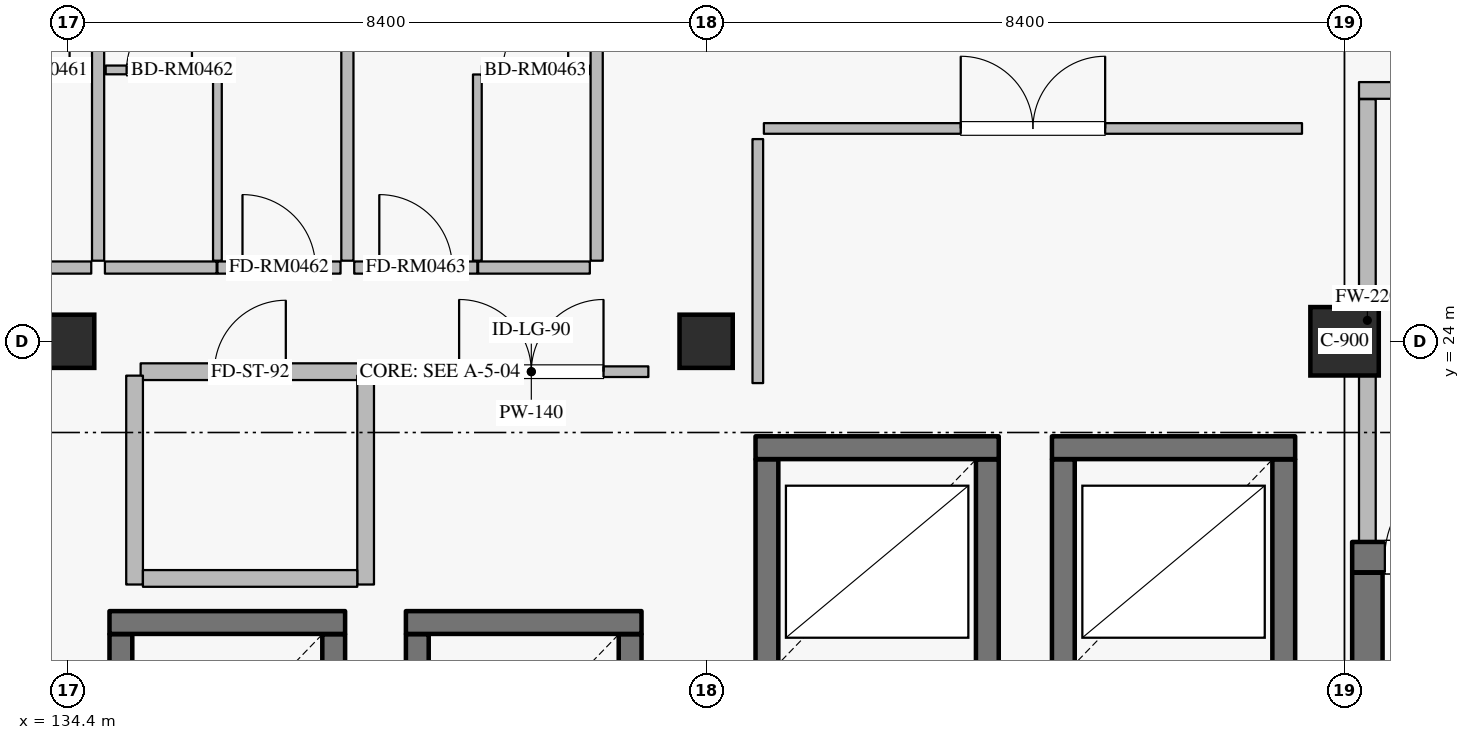
"""IFC4 building model, lengths in metres.
Left out: names, types, materials, properties, quantities, classifications, styles, units other than length and angle.
Written with IfcOpenShell. Run it as: python <this file> out.ifc"""

import sys

from ifc_helpers import new_model, si_unit, direction, frame, frame_2d, origin, origin_2d, place, context, subcontext, project, spatial, rectangle, extrude, element, fill, save


model = new_model("IFC4")
c1 = context("Model", 3, precision=1e-05, world=origin(), true_north=direction((0.0, 1.0)))
c2 = subcontext(c1, "Body", "Model", "MODEL_VIEW")
j1 = project(units=[si_unit("LENGTHUNIT", "METRE"), si_unit("PLANEANGLEUNIT", "RADIAN")], contexts=[c1])
p1 = place(None, origin())
s1 = spatial("IfcSite", under=j1, at=p1, CompositionType="ELEMENT")
p2 = place(p1, origin())
s2 = spatial("IfcBuilding", under=s1, at=p2, CompositionType="ELEMENT")
p3 = place(p2, frame((0.0, 0.0, 16.2)))
s3 = spatial("IfcBuildingStorey", under=s2, at=p3, CompositionType="ELEMENT", Elevation=16.2)
p4 = place(p3, frame((151.2, 24.0, 0.0), z_axis=(0.0, 0.0, 1.0), x_axis=(1.0, 0.0, 0.0)))
e1 = element("IfcColumn", 1, at=p4, inside=s3, PredefinedType="COLUMN", context=c2, shape_type="SweptSolid", body=[
    extrude(rectangle(XDim=0.9, YDim=0.9, at=origin_2d()), origin(), (0.0, 0.0, 1.0), 4.8),
])
for number, where, z_axis, x_axis in (
    (2, (134.4, 24.0, 0.0), (0.0, 0.0, 1.0), (1.0, 0.0, 0.0)),
    (3, (142.8, 24.0, 0.0), (0.0, 0.0, 1.0), (1.0, 0.0, 0.0)),
):
    element("IfcColumn", number, at=place(p3, frame(where, z_axis=z_axis, x_axis=x_axis)), inside=s3, PredefinedType="COLUMN", context=c2, shape_type="SweptSolid", body=[
        extrude(rectangle(XDim=0.7, YDim=0.7, at=origin_2d()), origin(), (0.0, 0.0, 1.0), 4.8),
    ])
p5 = place(p3, frame((137.9, 17.555, 0.0), z_axis=(0.0, 0.0, 1.0), x_axis=(0.0, 1.0, 0.0)))
e4 = element("IfcWall", 4, at=p5, inside=s3, PredefinedType="SHEAR", context=c2, shape_type="SweptSolid", body=[
    extrude(rectangle(XDim=2.59, YDim=0.3, at=frame_2d((1.295, 0.0))), origin(), (0.0, 0.0, 1.0), 4.535),
])
p6 = place(p3, frame((138.05, 20.3, 0.0), z_axis=(0.0, 0.0, 1.0), x_axis=(-1.0, 0.0, 0.0)))
e5 = element("IfcWall", 5, at=p6, inside=s3, PredefinedType="SHEAR", context=c2, shape_type="SweptSolid", body=[
    extrude(rectangle(XDim=3.1, YDim=0.3, at=frame_2d((1.55, 0.0))), origin(), (0.0, 0.0, 1.0), 4.535),
])
for number, where, z_axis, x_axis in (
    (6, (135.1, 20.145, 0.0), (0.0, 0.0, 1.0), (0.0, -1.0, 0.0)),
    (7, (141.8, 17.555, 0.0), (0.0, 0.0, 1.0), (0.0, 1.0, 0.0)),
):
    element("IfcWall", number, at=place(p3, frame(where, z_axis=z_axis, x_axis=x_axis)), inside=s3, PredefinedType="SHEAR", context=c2, shape_type="SweptSolid", body=[
        extrude(rectangle(XDim=2.59, YDim=0.3, at=frame_2d((1.295, 0.0))), origin(), (0.0, 0.0, 1.0), 4.535),
    ])
p7 = place(p3, frame((141.95, 20.3, 0.0), z_axis=(0.0, 0.0, 1.0), x_axis=(-1.0, 0.0, 0.0)))
e8 = element("IfcWall", 8, at=p7, inside=s3, PredefinedType="SHEAR", context=c2, shape_type="SweptSolid", body=[
    extrude(rectangle(XDim=3.1, YDim=0.3, at=frame_2d((1.55, 0.0))), origin(), (0.0, 0.0, 1.0), 4.535),
])
p8 = place(p3, frame((139.0, 20.145, 0.0), z_axis=(0.0, 0.0, 1.0), x_axis=(0.0, -1.0, 0.0)))
e9 = element("IfcWall", 9, at=p8, inside=s3, PredefinedType="SHEAR", context=c2, shape_type="SweptSolid", body=[
    extrude(rectangle(XDim=2.59, YDim=0.3, at=frame_2d((1.295, 0.0))), origin(), (0.0, 0.0, 1.0), 4.535),
])
p9 = place(p3, frame((146.5, 19.755, 0.0), z_axis=(0.0, 0.0, 1.0), x_axis=(0.0, 1.0, 0.0)))
e10 = element("IfcWall", 10, at=p9, inside=s3, PredefinedType="SHEAR", context=c2, shape_type="SweptSolid", body=[
    extrude(rectangle(XDim=2.69, YDim=0.3, at=frame_2d((1.345, 0.0))), origin(), (0.0, 0.0, 1.0), 4.535),
])
p10 = place(p3, frame((146.65, 22.6, 0.0), z_axis=(0.0, 0.0, 1.0), x_axis=(-1.0, 0.0, 0.0)))
e11 = element("IfcWall", 11, at=p10, inside=s3, PredefinedType="SHEAR", context=c2, shape_type="SweptSolid", body=[
    extrude(rectangle(XDim=3.2, YDim=0.3, at=frame_2d((1.6, 0.0))), origin(), (0.0, 0.0, 1.0), 4.535),
])
for number, where, z_axis, x_axis in (
    (12, (143.6, 22.445, 0.0), (0.0, 0.0, 1.0), (0.0, -1.0, 0.0)),
    (13, (150.4, 19.755, 0.0), (0.0, 0.0, 1.0), (0.0, 1.0, 0.0)),
):
    element("IfcWall", number, at=place(p3, frame(where, z_axis=z_axis, x_axis=x_axis)), inside=s3, PredefinedType="SHEAR", context=c2, shape_type="SweptSolid", body=[
        extrude(rectangle(XDim=2.69, YDim=0.3, at=frame_2d((1.345, 0.0))), origin(), (0.0, 0.0, 1.0), 4.535),
    ])
p11 = place(p3, frame((150.55, 22.6, 0.0), z_axis=(0.0, 0.0, 1.0), x_axis=(-1.0, 0.0, 0.0)))
e14 = element("IfcWall", 14, at=p11, inside=s3, PredefinedType="SHEAR", context=c2, shape_type="SweptSolid", body=[
    extrude(rectangle(XDim=3.2, YDim=0.3, at=frame_2d((1.6, 0.0))), origin(), (0.0, 0.0, 1.0), 4.535),
])
p12 = place(p3, frame((147.5, 22.445, 0.0), z_axis=(0.0, 0.0, 1.0), x_axis=(0.0, -1.0, 0.0)))
e15 = element("IfcWall", 15, at=p12, inside=s3, PredefinedType="SHEAR", context=c2, shape_type="SweptSolid", body=[
    extrude(rectangle(XDim=2.69, YDim=0.3, at=frame_2d((1.345, 0.0))), origin(), (0.0, 0.0, 1.0), 4.535),
])
p13 = place(p3, frame((151.3, 21.16, 0.0), z_axis=(0.0, 0.0, 1.0), x_axis=(1.0, 0.0, 0.0)))
e16 = element("IfcWall", 16, at=p13, inside=s3, PredefinedType="SHEAR", context=c2, shape_type="SweptSolid", body=[
    extrude(rectangle(XDim=8.2, YDim=0.4, at=frame_2d((4.1, 0.0))), origin(), (0.0, 0.0, 1.0), 4.535),
])
p14 = place(p13, frame((0.43, 0.0, 0.0)))
e17 = element("IfcOpeningElement", 17, at=p14, cuts=e16, PredefinedType="OPENING", context=c2, shape_type="SweptSolid", body=[
    extrude(rectangle(XDim=1.16, YDim=2.2, at=frame_2d((0.58, 1.1))), frame((0.0, 0.21, 0.0), z_axis=(0.0, -1.0, 0.0), x_axis=(1.0, 0.0, 0.0)), (0.0, 0.0, 1.0), 0.42),
])
p15 = place(p3, frame((151.5, 17.005, 0.0), z_axis=(0.0, 0.0, 1.0), x_axis=(0.0, 1.0, 0.0)))
e18 = element("IfcWall", 18, at=p15, inside=s3, PredefinedType="SHEAR", context=c2, shape_type="SweptSolid", body=[
    extrude(rectangle(XDim=3.95, YDim=0.4, at=frame_2d((1.975, 0.0))), origin(), (0.0, 0.0, 1.0), 4.535),
])
p16 = place(p3, frame((151.5, 21.365, 0.0), z_axis=(0.0, 0.0, 1.0), x_axis=(0.0, 1.0, 0.0)))
e19 = element("IfcWall", 19, at=p16, inside=s3, PredefinedType="PARTITIONING", context=c2, shape_type="SweptSolid", body=[
    extrude(rectangle(XDim=5.82, YDim=0.22, at=frame_2d((2.91, 0.0))), origin(), (0.0, 0.0, 1.0), 4.535),
])
p17 = place(p3, frame((151.39, 27.3, 0.0), z_axis=(0.0, 0.0, 1.0), x_axis=(1.0, 0.0, 0.0)))
e20 = element("IfcWall", 20, at=p17, inside=s3, PredefinedType="PARTITIONING", context=c2, shape_type="SweptSolid", body=[
    extrude(rectangle(XDim=3.82, YDim=0.22, at=frame_2d((1.91, 0.0))), origin(), (0.0, 0.0, 1.0), 4.535),
])
p18 = place(p17, frame((1.35, 0.0, 0.0)))
e21 = element("IfcOpeningElement", 21, at=p18, cuts=e20, PredefinedType="OPENING", context=c2, shape_type="SweptSolid", body=[
    extrude(rectangle(XDim=1.12, YDim=2.2, at=frame_2d((0.56, 1.1))), frame((0.0, 0.12, 0.0), z_axis=(0.0, -1.0, 0.0), x_axis=(1.0, 0.0, 0.0)), (0.0, 0.0, 1.0), 0.24),
])
p19 = place(p3, frame((133.24, 24.97, 0.0), z_axis=(0.0, 0.0, 1.0), x_axis=(1.0, 0.0, 0.0)))
e22 = element("IfcWall", 22, at=p19, inside=s3, PredefinedType="PARTITIONING", context=c2, shape_type="SweptSolid", body=[
    extrude(rectangle(XDim=1.47, YDim=0.16, at=frame_2d((0.735, 0.0))), origin(), (0.0, 0.0, 1.0), 4.535),
])
p20 = place(p3, frame((133.29, 27.57, 0.0), z_axis=(0.0, 0.0, 1.0), x_axis=(1.0, 0.0, 0.0)))
e23 = element("IfcWall", 23, at=p20, inside=s3, PredefinedType="PARTITIONING", context=c2, shape_type="SweptSolid", body=[
    extrude(rectangle(XDim=1.41, YDim=0.115, at=frame_2d((0.705, 0.0))), origin(), (0.0, 0.0, 1.0), 4.535),
])
p21 = place(p20, frame((0.275, 0.0, 0.0)))
e24 = element("IfcOpeningElement", 24, at=p21, cuts=e23, PredefinedType="OPENING", context=c2, shape_type="SweptSolid", body=[
    extrude(rectangle(XDim=0.86, YDim=2.12, at=frame_2d((0.43, 1.06))), frame((0.0, 0.067, 0.0), z_axis=(0.0, -1.0, 0.0), x_axis=(1.0, 0.0, 0.0)), (0.0, 0.0, 1.0), 0.135),
])
p22 = place(p3, frame((134.89, 24.97, 0.0), z_axis=(0.0, 0.0, 1.0), x_axis=(1.0, 0.0, 0.0)))
e25 = element("IfcWall", 25, at=p22, inside=s3, PredefinedType="PARTITIONING", context=c2, shape_type="SweptSolid", body=[
    extrude(rectangle(XDim=1.47, YDim=0.16, at=frame_2d((0.735, 0.0))), origin(), (0.0, 0.0, 1.0), 4.535),
])
p23 = place(p3, frame((136.37, 24.97, 0.0), z_axis=(0.0, 0.0, 1.0), x_axis=(1.0, 0.0, 0.0)))
e26 = element("IfcWall", 26, at=p23, inside=s3, PredefinedType="PARTITIONING", context=c2, shape_type="SweptSolid", body=[
    extrude(rectangle(XDim=1.62, YDim=0.16, at=frame_2d((0.81, 0.0))), origin(), (0.0, 0.0, 1.0), 4.535),
])
p24 = place(p23, frame((0.33, 0.0, 0.0)))
e27 = element("IfcOpeningElement", 27, at=p24, cuts=e26, PredefinedType="OPENING", context=c2, shape_type="SweptSolid", body=[
    extrude(rectangle(XDim=0.96, YDim=2.2, at=frame_2d((0.48, 1.1))), frame((0.0, 0.09, 0.0), z_axis=(0.0, -1.0, 0.0), x_axis=(1.0, 0.0, 0.0)), (0.0, 0.0, 1.0), 0.18),
])
p25 = place(p3, frame((136.37, 25.06, 0.0), z_axis=(0.0, 0.0, 1.0), x_axis=(0.0, 1.0, 0.0)))
e28 = element("IfcWall", 28, at=p25, inside=s3, PredefinedType="PARTITIONING", context=c2, shape_type="SweptSolid", body=[
    extrude(rectangle(XDim=2.45, YDim=0.115, at=frame_2d((1.225, 0.0))), origin(), (0.0, 0.0, 1.0), 4.535),
])
p26 = place(p3, frame((134.9, 27.57, 0.0), z_axis=(0.0, 0.0, 1.0), x_axis=(1.0, 0.0, 0.0)))
e29 = element("IfcWall", 29, at=p26, inside=s3, PredefinedType="PARTITIONING", context=c2, shape_type="SweptSolid", body=[
    extrude(rectangle(XDim=1.41, YDim=0.115, at=frame_2d((0.705, 0.0))), origin(), (0.0, 0.0, 1.0), 4.535),
])
p27 = place(p26, frame((0.275, 0.0, 0.0)))
e30 = element("IfcOpeningElement", 30, at=p27, cuts=e29, PredefinedType="OPENING", context=c2, shape_type="SweptSolid", body=[
    extrude(rectangle(XDim=0.86, YDim=2.12, at=frame_2d((0.43, 1.06))), frame((0.0, 0.067, 0.0), z_axis=(0.0, -1.0, 0.0), x_axis=(1.0, 0.0, 0.0)), (0.0, 0.0, 1.0), 0.135),
])
p28 = place(p3, frame((134.8, 25.06, 0.0), z_axis=(0.0, 0.0, 1.0), x_axis=(0.0, 1.0, 0.0)))
e31 = element("IfcWall", 31, at=p28, inside=s3, PredefinedType="PARTITIONING", context=c2, shape_type="SweptSolid", body=[
    extrude(rectangle(XDim=6.6, YDim=0.16, at=frame_2d((3.3, 0.0))), origin(), (0.0, 0.0, 1.0), 4.535),
])
p29 = place(p3, frame((138.17, 24.97, 0.0), z_axis=(0.0, 0.0, 1.0), x_axis=(1.0, 0.0, 0.0)))
e32 = element("IfcWall", 32, at=p29, inside=s3, PredefinedType="PARTITIONING", context=c2, shape_type="SweptSolid", body=[
    extrude(rectangle(XDim=1.62, YDim=0.16, at=frame_2d((0.81, 0.0))), origin(), (0.0, 0.0, 1.0), 4.535),
])
p30 = place(p29, frame((0.33, 0.0, 0.0)))
e33 = element("IfcOpeningElement", 33, at=p30, cuts=e32, PredefinedType="OPENING", context=c2, shape_type="SweptSolid", body=[
    extrude(rectangle(XDim=0.96, YDim=2.2, at=frame_2d((0.48, 1.1))), frame((0.0, 0.09, 0.0), z_axis=(0.0, -1.0, 0.0), x_axis=(1.0, 0.0, 0.0)), (0.0, 0.0, 1.0), 0.18),
])
p31 = place(p3, frame((139.8, 24.97, 0.0), z_axis=(0.0, 0.0, 1.0), x_axis=(1.0, 0.0, 0.0)))
e34 = element("IfcWall", 34, at=p31, inside=s3, PredefinedType="PARTITIONING", context=c2, shape_type="SweptSolid", body=[
    extrude(rectangle(XDim=1.47, YDim=0.16, at=frame_2d((0.735, 0.0))), origin(), (0.0, 0.0, 1.0), 4.535),
])
p32 = place(p3, frame((139.79, 25.06, 0.0), z_axis=(0.0, 0.0, 1.0), x_axis=(0.0, 1.0, 0.0)))
e35 = element("IfcWall", 35, at=p32, inside=s3, PredefinedType="PARTITIONING", context=c2, shape_type="SweptSolid", body=[
    extrude(rectangle(XDim=2.45, YDim=0.115, at=frame_2d((1.225, 0.0))), origin(), (0.0, 0.0, 1.0), 4.535),
])
p33 = place(p3, frame((139.85, 27.57, 0.0), z_axis=(0.0, 0.0, 1.0), x_axis=(1.0, 0.0, 0.0)))
e36 = element("IfcWall", 36, at=p33, inside=s3, PredefinedType="PARTITIONING", context=c2, shape_type="SweptSolid", body=[
    extrude(rectangle(XDim=1.41, YDim=0.115, at=frame_2d((0.705, 0.0))), origin(), (0.0, 0.0, 1.0), 4.535),
])
p34 = place(p33, frame((0.275, 0.0, 0.0)))
e37 = element("IfcOpeningElement", 37, at=p34, cuts=e36, PredefinedType="OPENING", context=c2, shape_type="SweptSolid", body=[
    extrude(rectangle(XDim=0.86, YDim=2.12, at=frame_2d((0.43, 1.06))), frame((0.0, 0.067, 0.0), z_axis=(0.0, -1.0, 0.0), x_axis=(1.0, 0.0, 0.0)), (0.0, 0.0, 1.0), 0.135),
])
p35 = place(p3, frame((138.08, 25.06, 0.0), z_axis=(0.0, 0.0, 1.0), x_axis=(0.0, 1.0, 0.0)))
e38 = element("IfcWall", 38, at=p35, inside=s3, PredefinedType="PARTITIONING", context=c2, shape_type="SweptSolid", body=[
    extrude(rectangle(XDim=6.6, YDim=0.16, at=frame_2d((3.3, 0.0))), origin(), (0.0, 0.0, 1.0), 4.535),
])
p36 = place(p3, frame((141.36, 25.06, 0.0), z_axis=(0.0, 0.0, 1.0), x_axis=(0.0, 1.0, 0.0)))
e39 = element("IfcWall", 39, at=p36, inside=s3, PredefinedType="PARTITIONING", context=c2, shape_type="SweptSolid", body=[
    extrude(rectangle(XDim=3.39, YDim=0.16, at=frame_2d((1.695, 0.0))), origin(), (0.0, 0.0, 1.0), 4.535),
])
p37 = place(p3, frame((138.96, 23.6, 0.0), z_axis=(0.0, 0.0, 1.0), x_axis=(1.0, 0.0, 0.0)))
e40 = element("IfcWall", 40, at=p37, inside=s3, PredefinedType="PARTITIONING", context=c2, shape_type="SweptSolid", body=[
    extrude(rectangle(XDim=3.08, YDim=0.14, at=frame_2d((1.54, 0.0))), origin(), (0.0, 0.0, 1.0), 4.535),
])
p38 = place(p37, frame((0.59, 0.0, 0.0)))
e41 = element("IfcOpeningElement", 41, at=p38, cuts=e40, PredefinedType="OPENING", context=c2, shape_type="SweptSolid", body=[
    extrude(rectangle(XDim=1.9, YDim=2.4, at=frame_2d((0.95, 1.2))), frame((0.0, 0.08, 0.0), z_axis=(0.0, -1.0, 0.0), x_axis=(1.0, 0.0, 0.0)), (0.0, 0.0, 1.0), 0.16),
])
p39 = place(p3, frame((135.36, 23.6, 0.0), z_axis=(0.0, 0.0, 1.0), x_axis=(1.0, 0.0, 0.0)))
e42 = element("IfcWall", 42, at=p39, inside=s3, PredefinedType="PARTITIONING", context=c2, shape_type="SweptSolid", body=[
    extrude(rectangle(XDim=2.88, YDim=0.22, at=frame_2d((1.44, 0.0))), origin(), (0.0, 0.0, 1.0), 4.535),
])
p40 = place(p39, frame((0.97, 0.0, 0.0)))
e43 = element("IfcOpeningElement", 43, at=p40, cuts=e42, PredefinedType="OPENING", context=c2, shape_type="SweptSolid", body=[
    extrude(rectangle(XDim=0.94, YDim=2.15, at=frame_2d((0.47, 1.075))), frame((0.0, 0.12, 0.0), z_axis=(0.0, -1.0, 0.0), x_axis=(1.0, 0.0, 0.0)), (0.0, 0.0, 1.0), 0.24),
])
p41 = place(p3, frame((143.56, 26.8, 0.0), z_axis=(0.0, 0.0, 1.0), x_axis=(1.0, 0.0, 0.0)))
e44 = element("IfcWall", 44, at=p41, inside=s3, PredefinedType="PARTITIONING", context=c2, shape_type="SweptSolid", body=[
    extrude(rectangle(XDim=7.08, YDim=0.14, at=frame_2d((3.54, 0.0))), origin(), (0.0, 0.0, 1.0), 4.535),
])
p42 = place(p41, frame((2.59, 0.0, 0.0)))
e45 = element("IfcOpeningElement", 45, at=p42, cuts=e44, PredefinedType="OPENING", context=c2, shape_type="SweptSolid", body=[
    extrude(rectangle(XDim=1.9, YDim=2.4, at=frame_2d((0.95, 1.2))), frame((0.0, 0.08, 0.0), z_axis=(0.0, -1.0, 0.0), x_axis=(1.0, 0.0, 0.0)), (0.0, 0.0, 1.0), 0.16),
])
p43 = place(p3, frame((143.48, 23.45, 0.0), z_axis=(0.0, 0.0, 1.0), x_axis=(0.0, 1.0, 0.0)))
e46 = element("IfcWall", 46, at=p43, inside=s3, PredefinedType="PARTITIONING", context=c2, shape_type="SweptSolid", body=[
    extrude(rectangle(XDim=3.21, YDim=0.14, at=frame_2d((1.605, 0.0))), origin(), (0.0, 0.0, 1.0), 4.535),
])
for number, where, z_axis, x_axis in (
    (47, (135.28, 20.8, 0.0), (0.0, 0.0, 1.0), (0.0, 1.0, 0.0)),
    (48, (138.32, 20.8, 0.0), (0.0, 0.0, 1.0), (0.0, 1.0, 0.0)),
):
    element("IfcWall", number, at=place(p3, frame(where, z_axis=z_axis, x_axis=x_axis)), inside=s3, PredefinedType="PARTITIONING", context=c2, shape_type="SweptSolid", body=[
        extrude(rectangle(XDim=2.748, YDim=0.22, at=frame_2d((1.374, 0.0))), origin(), (0.0, 0.0, 1.0), 4.535),
    ])
p44 = place(p3, frame((135.39, 20.88, 0.0), z_axis=(0.0, 0.0, 1.0), x_axis=(1.0, 0.0, 0.0)))
e49 = element("IfcWall", 49, at=p44, inside=s3, PredefinedType="PARTITIONING", context=c2, shape_type="SweptSolid", body=[
    extrude(rectangle(XDim=2.82, YDim=0.22, at=frame_2d((1.41, 0.0))), origin(), (0.0, 0.0, 1.0), 4.535),
])
p45 = place(p14, origin())
e50 = element("IfcDoor", 50, at=p45, inside=s3, OperationType="SINGLE_SWING_RIGHT", PredefinedType="DOOR", context=c2, shape_type="SweptSolid", body=[
    extrude(rectangle(XDim=1.16, YDim=2.2, at=frame_2d((0.58, 1.1))), frame((0.0, 0.025, 0.0), z_axis=(0.0, -1.0, 0.0), x_axis=(1.0, 0.0, 0.0)), (0.0, 0.0, 1.0), 0.05),
])
fill(e17, e50)
p46 = place(p21, origin())
e51 = element("IfcDoor", 51, at=p46, inside=s3, OperationType="SINGLE_SWING_RIGHT", PredefinedType="DOOR", context=c2, shape_type="SweptSolid", body=[
    extrude(rectangle(XDim=0.86, YDim=2.12, at=frame_2d((0.43, 1.06))), frame((0.0, 0.025, 0.0), z_axis=(0.0, -1.0, 0.0), x_axis=(1.0, 0.0, 0.0)), (0.0, 0.0, 1.0), 0.05),
])
fill(e24, e51)
p47 = place(p24, origin())
e52 = element("IfcDoor", 52, at=p47, inside=s3, OperationType="SINGLE_SWING_LEFT", PredefinedType="DOOR", context=c2, shape_type="SweptSolid", body=[
    extrude(rectangle(XDim=0.96, YDim=2.2, at=frame_2d((0.48, 1.1))), frame((0.0, 0.025, 0.0), z_axis=(0.0, -1.0, 0.0), x_axis=(1.0, 0.0, 0.0)), (0.0, 0.0, 1.0), 0.05),
])
fill(e27, e52)
p48 = place(p27, origin())
e53 = element("IfcDoor", 53, at=p48, inside=s3, OperationType="SINGLE_SWING_RIGHT", PredefinedType="DOOR", context=c2, shape_type="SweptSolid", body=[
    extrude(rectangle(XDim=0.86, YDim=2.12, at=frame_2d((0.43, 1.06))), frame((0.0, 0.025, 0.0), z_axis=(0.0, -1.0, 0.0), x_axis=(1.0, 0.0, 0.0)), (0.0, 0.0, 1.0), 0.05),
])
fill(e30, e53)
p49 = place(p30, origin())
e54 = element("IfcDoor", 54, at=p49, inside=s3, OperationType="SINGLE_SWING_LEFT", PredefinedType="DOOR", context=c2, shape_type="SweptSolid", body=[
    extrude(rectangle(XDim=0.96, YDim=2.2, at=frame_2d((0.48, 1.1))), frame((0.0, 0.025, 0.0), z_axis=(0.0, -1.0, 0.0), x_axis=(1.0, 0.0, 0.0)), (0.0, 0.0, 1.0), 0.05),
])
fill(e33, e54)
p50 = place(p34, origin())
e55 = element("IfcDoor", 55, at=p50, inside=s3, OperationType="SINGLE_SWING_RIGHT", PredefinedType="DOOR", context=c2, shape_type="SweptSolid", body=[
    extrude(rectangle(XDim=0.86, YDim=2.12, at=frame_2d((0.43, 1.06))), frame((0.0, 0.025, 0.0), z_axis=(0.0, -1.0, 0.0), x_axis=(1.0, 0.0, 0.0)), (0.0, 0.0, 1.0), 0.05),
])
fill(e37, e55)
p51 = place(p38, origin())
e56 = element("IfcDoor", 56, at=p51, inside=s3, OperationType="DOUBLE_DOOR_SINGLE_SWING", PredefinedType="DOOR", context=c2, shape_type="SweptSolid", body=[
    extrude(rectangle(XDim=1.9, YDim=2.4, at=frame_2d((0.95, 1.2))), frame((0.0, 0.025, 0.0), z_axis=(0.0, -1.0, 0.0), x_axis=(1.0, 0.0, 0.0)), (0.0, 0.0, 1.0), 0.05),
])
fill(e41, e56)
p52 = place(p40, origin())
e57 = element("IfcDoor", 57, at=p52, inside=s3, OperationType="SINGLE_SWING_RIGHT", PredefinedType="DOOR", context=c2, shape_type="SweptSolid", body=[
    extrude(rectangle(XDim=0.94, YDim=2.15, at=frame_2d((0.47, 1.075))), frame((0.0, 0.025, 0.0), z_axis=(0.0, -1.0, 0.0), x_axis=(1.0, 0.0, 0.0)), (0.0, 0.0, 1.0), 0.05),
])
fill(e43, e57)
p53 = place(p42, origin())
e58 = element("IfcDoor", 58, at=p53, inside=s3, OperationType="DOUBLE_DOOR_SINGLE_SWING", PredefinedType="DOOR", context=c2, shape_type="SweptSolid", body=[
    extrude(rectangle(XDim=1.9, YDim=2.4, at=frame_2d((0.95, 1.2))), frame((0.0, 0.025, 0.0), z_axis=(0.0, -1.0, 0.0), x_axis=(1.0, 0.0, 0.0)), (0.0, 0.0, 1.0), 0.05),
])
fill(e45, e58)
save(model, sys.argv[1])
